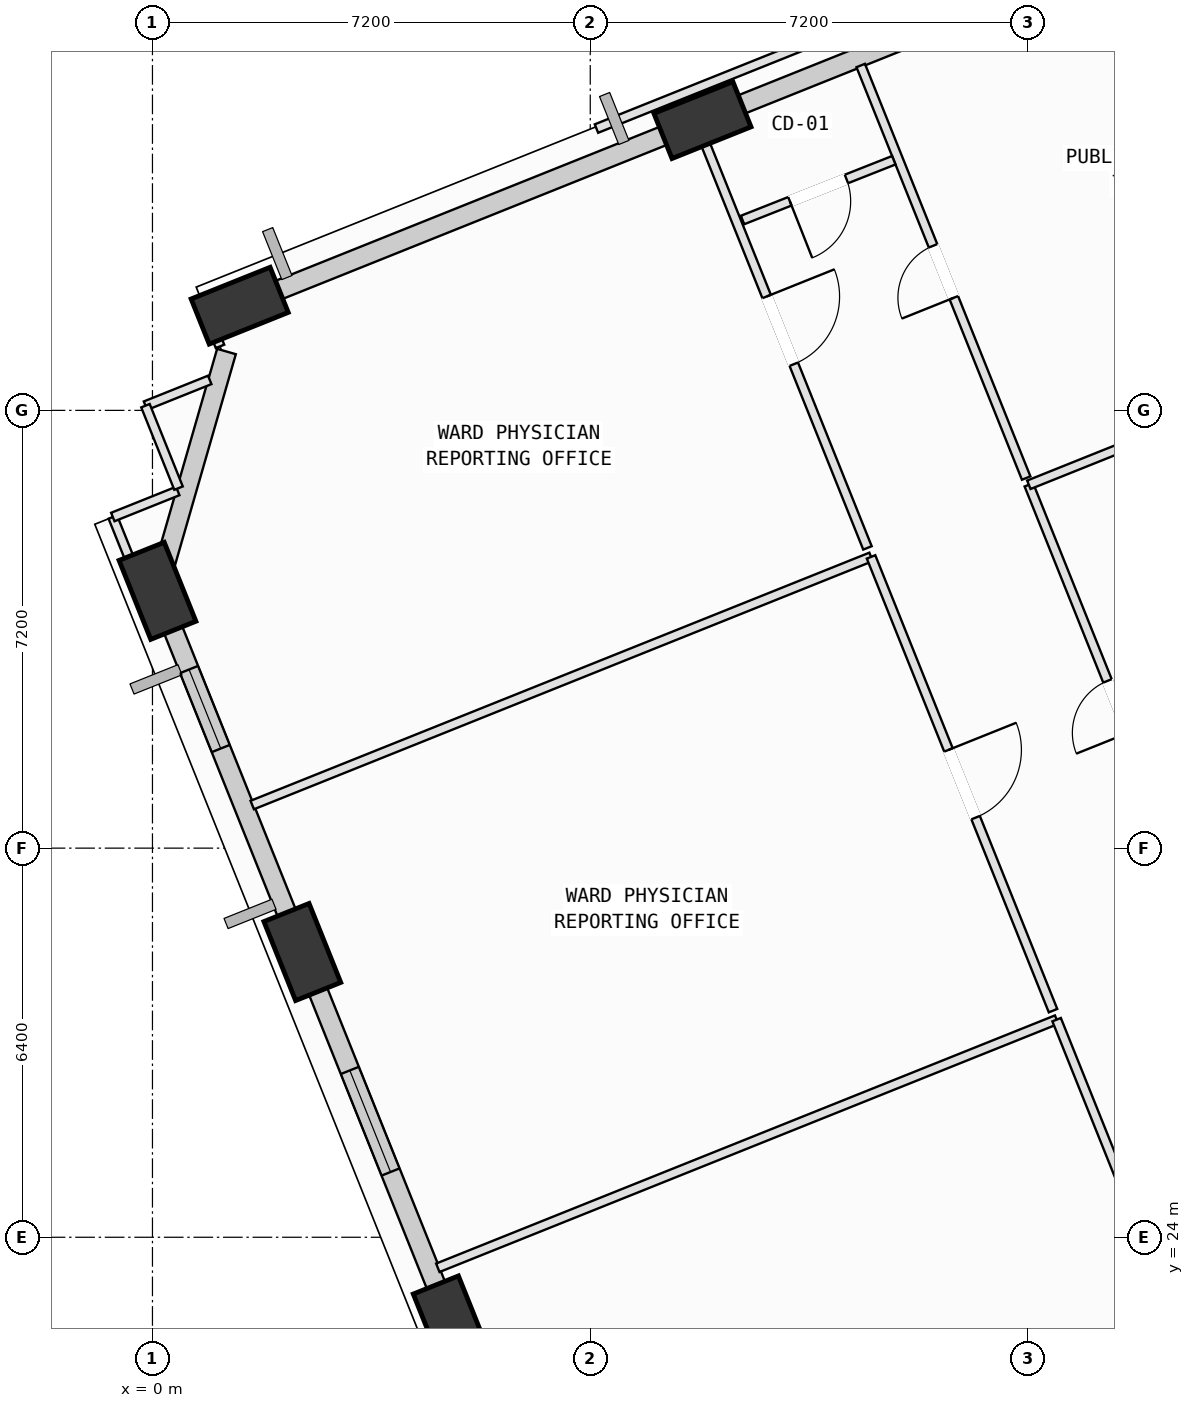
"""IFC4 building model, lengths in metres.
Left out: names, types, materials, properties, quantities, classifications, styles, units other than length and angle.
Written with IfcOpenShell. Run it as: python <this file> out.ifc"""

import sys

from ifc_helpers import new_model, si_unit, direction, frame, frame_2d, origin, origin_2d, place, context, subcontext, project, spatial, rectangle, extrude, element, fill, save


model = new_model("IFC4")
c1 = context("Model", 3, precision=1e-05, world=origin(), true_north=direction((0.0, 1.0)))
c2 = subcontext(c1, "Body", "Model", "MODEL_VIEW")
j1 = project(units=[si_unit("LENGTHUNIT", "METRE"), si_unit("PLANEANGLEUNIT", "RADIAN")], contexts=[c1])
p1 = place(None, origin())
s1 = spatial("IfcSite", under=j1, at=p1, CompositionType="ELEMENT")
p2 = place(p1, origin())
s2 = spatial("IfcBuilding", under=s1, at=p2, CompositionType="ELEMENT")
p3 = place(p2, frame((0.0, 0.0, 116.4)))
s3 = spatial("IfcBuildingStorey", under=s2, at=p3, CompositionType="ELEMENT", Elevation=116.4)
p4 = place(p3, frame((9.045, 42.374, 0.002), z_axis=(-0.071468567795, -0.101595690945, 0.992255289428), x_axis=(0.971621225937, -0.231980521435, 0.04623019558)))
e1 = element("IfcColumn", 1, at=p4, inside=s3, PredefinedType="COLUMN", context=c2, shape_type="SweptSolid", body=[
    extrude(rectangle(XDim=1.4, YDim=0.8, at=origin_2d()), origin(), (0.0, 0.0, 1.0), 4.028),
])
p5 = place(p3, frame((1.434, 39.322, 0.002), z_axis=(-0.058452778116, -0.132440575855, 0.989465899664), x_axis=(0.997829351184, -0.037863766631, 0.0538787629)))
e2 = element("IfcColumn", 2, at=p5, inside=s3, PredefinedType="COLUMN", context=c2, shape_type="SweptSolid", body=[
    extrude(rectangle(XDim=1.4, YDim=0.8, at=origin_2d()), origin(), (0.0, 0.0, 1.0), 4.039),
])
p6 = place(p3, frame((0.083, 34.632, 0.002), z_axis=(-0.039178405028, -0.137849943616, 0.989677950459), x_axis=(-0.106874967089, 0.985334956087, 0.1330141561)))
e3 = element("IfcColumn", 3, at=p6, inside=s3, PredefinedType="COLUMN", context=c2, shape_type="SweptSolid", body=[
    extrude(rectangle(XDim=1.4, YDim=0.8, at=origin_2d()), origin(), (0.0, 0.0, 1.0), 4.038),
])
p7 = place(p3, frame((2.465, 28.692, 0.002), z_axis=(-0.014963421755, -0.128128085071, 0.991644739726), x_axis=(-0.262901665614, 0.957364620069, 0.119731777142)))
e4 = element("IfcColumn", 4, at=p7, inside=s3, PredefinedType="COLUMN", context=c2, shape_type="SweptSolid", body=[
    extrude(rectangle(XDim=1.4, YDim=0.8, at=origin_2d()), origin(), (0.0, 0.0, 1.0), 4.03),
])
p8 = place(p3, frame((4.921, 22.566, 0.002), z_axis=(0.010191079334, -0.117986007762, 0.992962961985), x_axis=(-0.450108088675, 0.886183267608, 0.109917808931)))
e5 = element("IfcColumn", 5, at=p8, inside=s3, PredefinedType="COLUMN", context=c2, shape_type="SweptSolid", body=[
    extrude(rectangle(XDim=1.4, YDim=0.8, at=origin_2d()), origin(), (0.0, 0.0, 1.0), 4.025),
])
p9 = place(p3, frame((9.293, 42.473, 0.0), z_axis=(0.0, 0.0, 1.0), x_axis=(0.928173670316, 0.372147333366, 0.0)))
e6 = element("IfcWall", 6, at=p9, inside=s3, PredefinedType="SOLIDWALL", context=c2, shape_type="SweptSolid", body=[
    extrude(rectangle(XDim=7.231, YDim=0.32, at=frame_2d((3.615, 0.0))), origin(), (0.0, 0.0, 1.0), 3.165),
])
p10 = place(p3, frame((1.66, 39.412, 0.0), z_axis=(0.0, 0.0, 1.0), x_axis=(0.928159064782, 0.372183758999, 0.0)))
e7 = element("IfcWall", 7, at=p10, inside=s3, PredefinedType="SOLIDWALL", context=c2, shape_type="SweptSolid", body=[
    extrude(rectangle(XDim=7.27, YDim=0.32, at=frame_2d((3.635, 0.0))), origin(), (0.0, 0.0, 1.0), 3.165),
])
p11 = place(p3, frame((0.14, 34.831, 0.0), z_axis=(0.0, 0.0, 1.0), x_axis=(0.276925520659, 0.960891386166, 0.0)))
e8 = element("IfcWall", 8, at=p11, inside=s3, PredefinedType="SOLIDWALL", context=c2, shape_type="SweptSolid", body=[
    extrude(rectangle(XDim=3.89, YDim=0.32, at=frame_2d((1.945, 0.0))), origin(), (0.0, 0.0, 1.0), 3.165),
])
p12 = place(p3, frame((2.371, 28.926, 0.0), z_axis=(0.0, 0.0, 1.0), x_axis=(-0.37214668544, 0.928173930099, 0.0)))
e9 = element("IfcWall", 9, at=p12, inside=s3, PredefinedType="SOLIDWALL", context=c2, shape_type="SweptSolid", body=[
    extrude(rectangle(XDim=5.456, YDim=0.32, at=frame_2d((2.728, 0.0))), origin(), (0.0, 0.0, 1.0), 3.165),
])
p13 = place(p12, frame((3.354, 0.0, 0.75)))
e10 = element("IfcOpeningElement", 10, at=p13, cuts=e9, PredefinedType="OPENING", context=c2, shape_type="SweptSolid", body=[
    extrude(rectangle(XDim=1.4, YDim=1.85, at=frame_2d((0.7, 0.925))), frame((0.0, 0.17, 0.0), z_axis=(0.0, -1.0, 0.0), x_axis=(1.0, 0.0, 0.0)), (0.0, 0.0, 1.0), 0.34),
])
p14 = place(p3, frame((4.823, 22.81, 0.0), z_axis=(0.0, 0.0, 1.0), x_axis=(-0.372175910941, 0.928162211747, 0.0)))
e11 = element("IfcWall", 11, at=p14, inside=s3, PredefinedType="SOLIDWALL", context=c2, shape_type="SweptSolid", body=[
    extrude(rectangle(XDim=5.628, YDim=0.32, at=frame_2d((2.814, 0.0))), origin(), (0.0, 0.0, 1.0), 3.165),
])
p15 = place(p14, frame((2.438, 0.0, 0.75)))
e12 = element("IfcOpeningElement", 12, at=p15, cuts=e11, PredefinedType="OPENING", context=c2, shape_type="SweptSolid", body=[
    extrude(rectangle(XDim=1.8, YDim=2.05, at=frame_2d((0.9, 1.025))), frame((0.0, 0.17, 0.0), z_axis=(0.0, -1.0, 0.0), x_axis=(1.0, 0.0, 0.0)), (0.0, 0.0, 1.0), 0.34),
])
p16 = place(p3, frame((4.976, 21.812, 0.0), z_axis=(0.0, 0.0, 1.0), x_axis=(-0.372032450778, 0.928219723755, 0.0)))
e13 = element("IfcWall", 13, at=p16, inside=s3, PredefinedType="PARTITIONING", context=c2, shape_type="SweptSolid", body=[
    extrude(rectangle(XDim=0.984, YDim=0.15, at=frame_2d((0.492, 0.0))), origin(), (0.0, 0.0, 1.0), 3.165),
])
p17 = place(p3, frame((4.693, 23.498, 0.0), z_axis=(0.0, 0.0, 1.0), x_axis=(0.928153869295, 0.372196715344, 0.0)))
e14 = element("IfcWall", 14, at=p17, inside=s3, PredefinedType="PARTITIONING", context=c2, shape_type="SweptSolid", body=[
    extrude(rectangle(XDim=10.965, YDim=0.15, at=frame_2d((5.482, 0.0))), origin(), (0.0, 0.0, 1.0), 3.78),
])
p18 = place(p3, frame((14.87, 27.579, 0.0), z_axis=(0.0, 0.0, 1.0), x_axis=(0.372222245283, -0.928143631189, 0.0)))
e15 = element("IfcWall", 15, at=p18, inside=s3, PredefinedType="PARTITIONING", context=c2, shape_type="SweptSolid", body=[
    extrude(rectangle(XDim=7.541, YDim=0.15, at=frame_2d((3.771, 0.0))), origin(), (0.0, 0.0, 1.0), 3.78),
])
p19 = place(p18, frame((3.17, 0.0, 0.0)))
e16 = element("IfcOpeningElement", 16, at=p19, cuts=e15, PredefinedType="OPENING", context=c2, shape_type="SweptSolid", body=[
    extrude(rectangle(XDim=1.2, YDim=2.15, at=frame_2d((0.6, 1.075))), frame((0.0, 0.085, 0.0), z_axis=(0.0, -1.0, 0.0), x_axis=(1.0, 0.0, 0.0)), (0.0, 0.0, 1.0), 0.17),
])
p20 = place(p3, frame((1.641, 31.109, 0.0), z_axis=(0.0, 0.0, 1.0), x_axis=(0.928153869295, 0.372196715344, 0.0)))
e17 = element("IfcWall", 17, at=p20, inside=s3, PredefinedType="PARTITIONING", context=c2, shape_type="SweptSolid", body=[
    extrude(rectangle(XDim=10.965, YDim=0.15, at=frame_2d((5.482, 0.0))), origin(), (0.0, 0.0, 1.0), 3.78),
])
p21 = place(p3, frame((11.818, 35.19, 0.0), z_axis=(0.0, 0.0, 1.0), x_axis=(0.372222898555, -0.928143369201, 0.0)))
e18 = element("IfcWall", 18, at=p21, inside=s3, PredefinedType="PARTITIONING", context=c2, shape_type="SweptSolid", body=[
    extrude(rectangle(XDim=8.041, YDim=0.15, at=frame_2d((4.021, 0.0))), origin(), (0.0, 0.0, 1.0), 3.78),
])
p22 = place(p21, frame((3.42, 0.0, 0.0)))
e19 = element("IfcOpeningElement", 19, at=p22, cuts=e18, PredefinedType="OPENING", context=c2, shape_type="SweptSolid", body=[
    extrude(rectangle(XDim=1.2, YDim=2.15, at=frame_2d((0.6, 1.075))), frame((0.0, 0.085, 0.0), z_axis=(0.0, -1.0, 0.0), x_axis=(1.0, 0.0, 0.0)), (0.0, 0.0, 1.0), 0.17),
])
p23 = place(p3, frame((2.515, 27.948, 0.0), z_axis=(0.0, 0.0, 1.0), x_axis=(-0.371478291638, 0.928441639976, 0.0)))
e20 = element("IfcWall", 20, at=p23, inside=s3, PredefinedType="PARTITIONING", context=c2, shape_type="SweptSolid", body=[
    extrude(rectangle(XDim=0.961, YDim=0.15, at=frame_2d((0.48, 0.0))), origin(), (0.0, 0.0, 1.0), 3.165),
])
p24 = place(p3, frame((-0.115, 37.677, 0.0), z_axis=(0.0, 0.0, 1.0), x_axis=(0.928076953017, 0.372388465556, 0.0)))
e21 = element("IfcWall", 21, at=p24, inside=s3, PredefinedType="PARTITIONING", context=c2, shape_type="SweptSolid", body=[
    extrude(rectangle(XDim=1.139, YDim=0.15, at=frame_2d((0.569, 0.0))), origin(), (0.0, 0.0, 1.0), 3.78),
])
p25 = place(p3, frame((1.111, 38.652, 0.0), z_axis=(0.0, 0.0, 1.0), x_axis=(-0.37251940051, 0.928024404983, 0.0)))
e22 = element("IfcWall", 22, at=p25, inside=s3, PredefinedType="PARTITIONING", context=c2, shape_type="SweptSolid", body=[
    extrude(rectangle(XDim=0.671, YDim=0.15, at=frame_2d((0.335, 0.0))), origin(), (0.0, 0.0, 1.0), 2.965),
])
p26 = place(p3, frame((0.861, 39.275, 0.0), z_axis=(0.0, 0.0, 1.0), x_axis=(0.92811522529, 0.37229306814, 0.0)))
e23 = element("IfcWall", 23, at=p26, inside=s3, PredefinedType="PARTITIONING", context=c2, shape_type="SweptSolid", body=[
    extrude(rectangle(XDim=0.793, YDim=0.15, at=frame_2d((0.396, 0.0))), origin(), (0.0, 0.0, 1.0), 3.78),
])
p27 = place(p3, frame((8.345, 42.276, 0.0), z_axis=(0.0, 0.0, 1.0), x_axis=(0.9282178773, 0.372037057643, 0.0)))
e24 = element("IfcWall", 24, at=p27, inside=s3, PredefinedType="PARTITIONING", context=c2, shape_type="SweptSolid", body=[
    extrude(rectangle(XDim=0.586, YDim=0.15, at=frame_2d((0.293, 0.0))), origin(), (0.0, 0.0, 1.0), 3.78),
])
p28 = place(p3, frame((8.889, 42.494, 0.0), z_axis=(0.0, 0.0, 1.0), x_axis=(0.372253112899, -0.92813125146, 0.0)))
e25 = element("IfcWall", 25, at=p28, inside=s3, PredefinedType="PARTITIONING", context=c2, shape_type="SweptSolid", body=[
    extrude(rectangle(XDim=7.71, YDim=0.15, at=frame_2d((3.855, 0.0))), origin(), (0.0, 0.0, 1.0), 2.965),
])
p29 = place(p28, frame((3.255, 0.0, 0.0)))
e26 = element("IfcOpeningElement", 26, at=p29, cuts=e25, PredefinedType="OPENING", context=c2, shape_type="SweptSolid", body=[
    extrude(rectangle(XDim=1.2, YDim=2.15, at=frame_2d((0.6, 1.075))), frame((0.0, 0.085, 0.0), z_axis=(0.0, -1.0, 0.0), x_axis=(1.0, 0.0, 0.0)), (0.0, 0.0, 1.0), 0.17),
])
p30 = place(p3, frame((0.127, 33.904, 0.0), z_axis=(0.0, 0.0, 1.0), x_axis=(-0.372336019867, 0.928097994993, 0.0)))
e27 = element("IfcWall", 27, at=p30, inside=s3, PredefinedType="PARTITIONING", context=c2, shape_type="SweptSolid", body=[
    extrude(rectangle(XDim=2.092, YDim=0.15, at=frame_2d((1.046, 0.0))), origin(), (0.0, 0.0, 1.0), 3.165),
])
p31 = place(p3, frame((-0.652, 35.846, 0.0), z_axis=(0.0, 0.0, 1.0), x_axis=(0.92825703939, 0.371939334869, 0.0)))
e28 = element("IfcWall", 28, at=p31, inside=s3, PredefinedType="PARTITIONING", context=c2, shape_type="SweptSolid", body=[
    extrude(rectangle(XDim=1.151, YDim=0.15, at=frame_2d((0.575, 0.0))), origin(), (0.0, 0.0, 1.0), 3.78),
])
p32 = place(p3, frame((0.429, 36.321, 0.0), z_axis=(0.0, 0.0, 1.0), x_axis=(-0.372312458111, 0.928107447193, 0.0)))
e29 = element("IfcWall", 29, at=p32, inside=s3, PredefinedType="PARTITIONING", context=c2, shape_type="SweptSolid", body=[
    extrude(rectangle(XDim=1.461, YDim=0.15, at=frame_2d((0.73, 0.0))), origin(), (0.0, 0.0, 1.0), 3.78),
])
p33 = place(p3, frame((17.342, 29.071, 0.0), z_axis=(0.0, 0.0, 1.0), x_axis=(-0.372155371127, 0.928170447569, 0.0)))
e30 = element("IfcWall", 30, at=p33, inside=s3, PredefinedType="PARTITIONING", context=c2, shape_type="SweptSolid", body=[
    extrude(rectangle(XDim=7.87, YDim=0.15, at=frame_2d((3.935, 0.0))), origin(), (0.0, 0.0, 1.0), 3.78),
])
p34 = place(p33, frame((3.475, 0.0, 0.0)))
e31 = element("IfcOpeningElement", 31, at=p34, cuts=e30, PredefinedType="OPENING", context=c2, shape_type="SweptSolid", body=[
    extrude(rectangle(XDim=0.92, YDim=2.1, at=frame_2d((0.46, 1.05))), frame((0.0, 0.085, 0.0), z_axis=(0.0, -1.0, 0.0), x_axis=(1.0, 0.0, 0.0)), (0.0, 0.0, 1.0), 0.17),
])
p35 = place(p3, frame((14.413, 36.376, 0.0), z_axis=(0.0, 0.0, 1.0), x_axis=(0.928184887564, 0.372119355178, 0.0)))
e32 = element("IfcWall", 32, at=p35, inside=s3, PredefinedType="PARTITIONING", context=c2, shape_type="SweptSolid", body=[
    extrude(rectangle(XDim=6.815, YDim=0.15, at=frame_2d((3.408, 0.0))), origin(), (0.0, 0.0, 1.0), 3.78),
])
p36 = place(p3, frame((14.369, 36.487, 0.0), z_axis=(0.0, 0.0, 1.0), x_axis=(-0.372213948796, 0.928146958365, 0.0)))
e33 = element("IfcWall", 33, at=p36, inside=s3, PredefinedType="PARTITIONING", context=c2, shape_type="SweptSolid", body=[
    extrude(rectangle(XDim=7.31, YDim=0.15, at=frame_2d((3.655, 0.0))), origin(), (0.0, 0.0, 1.0), 3.78),
])
p37 = place(p36, frame((3.195, 0.0, 0.0)))
e34 = element("IfcOpeningElement", 34, at=p37, cuts=e33, PredefinedType="OPENING", context=c2, shape_type="SweptSolid", body=[
    extrude(rectangle(XDim=0.92, YDim=2.1, at=frame_2d((0.46, 1.05))), frame((0.0, 0.085, 0.0), z_axis=(0.0, -1.0, 0.0), x_axis=(1.0, 0.0, 0.0)), (0.0, 0.0, 1.0), 0.17),
])
p38 = place(p3, frame((12.192, 41.714, 0.0), z_axis=(0.0, 0.0, 1.0), x_axis=(-0.930010784607, -0.36753223058, 0.0)))
e35 = element("IfcWall", 35, at=p38, inside=s3, PredefinedType="PARTITIONING", context=c2, shape_type="SweptSolid", body=[
    extrude(rectangle(XDim=2.675, YDim=0.15, at=frame_2d((1.337, 0.0))), origin(), (0.0, 0.0, 1.0), 3.78),
])
p39 = place(p38, frame((0.838, 0.0, 0.0)))
e36 = element("IfcOpeningElement", 36, at=p39, cuts=e35, PredefinedType="OPENING", context=c2, shape_type="SweptSolid", body=[
    extrude(rectangle(XDim=1.0, YDim=2.12, at=frame_2d((0.5, 1.06))), frame((0.0, 0.085, 0.0), z_axis=(0.0, -1.0, 0.0), x_axis=(1.0, 0.0, 0.0)), (0.0, 0.0, 1.0), 0.17),
])
p40 = place(p3, frame((7.302, 42.235, 0.0), z_axis=(0.0, 0.0, 1.0), x_axis=(0.928186012977, 0.372116548024, 0.0)))
e37 = element("IfcWall", 37, at=p40, inside=s3, PredefinedType="PARTITIONING", context=c2, shape_type="SweptSolid", body=[
    extrude(rectangle(XDim=5.74, YDim=0.15, at=frame_2d((2.87, 0.0))), origin(), (0.0, 0.0, 1.0), 3.78),
])
p41 = place(p13, origin())
e38 = element("IfcWindow", 38, at=p41, inside=s3, PartitioningType="SINGLE_PANEL", PredefinedType="WINDOW", context=c2, shape_type="SweptSolid", body=[
    extrude(rectangle(XDim=1.4, YDim=1.85, at=frame_2d((0.7, 0.925))), frame((0.0, 0.03, 0.0), z_axis=(0.0, -1.0, 0.0), x_axis=(1.0, 0.0, 0.0)), (0.0, 0.0, 1.0), 0.06),
])
fill(e10, e38)
p42 = place(p15, origin())
e39 = element("IfcWindow", 39, at=p42, inside=s3, PartitioningType="SINGLE_PANEL", PredefinedType="WINDOW", context=c2, shape_type="SweptSolid", body=[
    extrude(rectangle(XDim=1.8, YDim=2.05, at=frame_2d((0.9, 1.025))), frame((0.0, 0.03, 0.0), z_axis=(0.0, -1.0, 0.0), x_axis=(1.0, 0.0, 0.0)), (0.0, 0.0, 1.0), 0.06),
])
fill(e12, e39)
p43 = place(p22, origin())
e40 = element("IfcDoor", 40, at=p43, inside=s3, OperationType="SINGLE_SWING_LEFT", PredefinedType="DOOR", context=c2, shape_type="SweptSolid", body=[
    extrude(rectangle(XDim=1.2, YDim=2.15, at=frame_2d((0.6, 1.075))), frame((0.0, 0.025, 0.0), z_axis=(0.0, -1.0, 0.0), x_axis=(1.0, 0.0, 0.0)), (0.0, 0.0, 1.0), 0.05),
])
fill(e19, e40)
p44 = place(p29, origin())
e41 = element("IfcDoor", 41, at=p44, inside=s3, OperationType="SINGLE_SWING_LEFT", PredefinedType="DOOR", context=c2, shape_type="SweptSolid", body=[
    extrude(rectangle(XDim=1.2, YDim=2.15, at=frame_2d((0.6, 1.075))), frame((0.0, 0.025, 0.0), z_axis=(0.0, -1.0, 0.0), x_axis=(1.0, 0.0, 0.0)), (0.0, 0.0, 1.0), 0.05),
])
fill(e26, e41)
p45 = place(p34, origin())
e42 = element("IfcDoor", 42, at=p45, inside=s3, OperationType="SINGLE_SWING_LEFT", PredefinedType="DOOR", context=c2, shape_type="SweptSolid", body=[
    extrude(rectangle(XDim=0.92, YDim=2.1, at=frame_2d((0.46, 1.05))), frame((0.0, 0.025, 0.0), z_axis=(0.0, -1.0, 0.0), x_axis=(1.0, 0.0, 0.0)), (0.0, 0.0, 1.0), 0.05),
])
fill(e31, e42)
p46 = place(p37, origin())
e43 = element("IfcDoor", 43, at=p46, inside=s3, OperationType="SINGLE_SWING_LEFT", PredefinedType="DOOR", context=c2, shape_type="SweptSolid", body=[
    extrude(rectangle(XDim=0.92, YDim=2.1, at=frame_2d((0.46, 1.05))), frame((0.0, 0.025, 0.0), z_axis=(0.0, -1.0, 0.0), x_axis=(1.0, 0.0, 0.0)), (0.0, 0.0, 1.0), 0.05),
])
fill(e34, e43)
p47 = place(p39, origin())
e44 = element("IfcDoor", 44, at=p47, inside=s3, OperationType="SINGLE_SWING_RIGHT", PredefinedType="DOOR", context=c2, shape_type="SweptSolid", body=[
    extrude(rectangle(XDim=1.0, YDim=2.12, at=frame_2d((0.5, 1.06))), frame((0.0, 0.025, 0.0), z_axis=(0.0, -1.0, 0.0), x_axis=(1.0, 0.0, 0.0)), (0.0, 0.0, 1.0), 0.05),
])
fill(e36, e44)
save(model, sys.argv[1])
